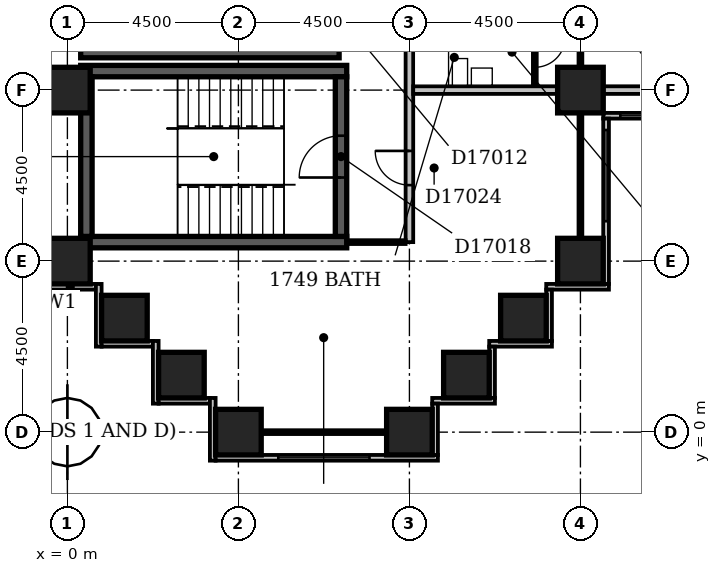
"""IFC4 building model, lengths in metres.
Left out: names, types, materials, properties, quantities, classifications, styles, units other than length and angle.
Written with IfcOpenShell. Run it as: python <this file> out.ifc"""

import sys

from ifc_helpers import new_model, si_unit, direction, frame, frame_2d, origin, origin_2d, place, context, subcontext, project, spatial, rectangle, extrude, element, fill, save


model = new_model("IFC4")
c1 = context("Model", 3, precision=1e-05, world=origin(), true_north=direction((0.0, 1.0)))
c2 = subcontext(c1, "Body", "Model", "MODEL_VIEW")
j1 = project(units=[si_unit("LENGTHUNIT", "METRE"), si_unit("PLANEANGLEUNIT", "RADIAN")], contexts=[c1])
p1 = place(None, origin())
s1 = spatial("IfcSite", under=j1, at=p1, CompositionType="ELEMENT")
p2 = place(p1, origin())
s2 = spatial("IfcBuilding", under=s1, at=p2, CompositionType="ELEMENT")
p3 = place(p2, frame((0.0, 0.0, 72.2)))
s3 = spatial("IfcBuildingStorey", under=s2, at=p3, CompositionType="ELEMENT", Elevation=72.2)
for number, where, z_axis, x_axis in (
    (1, (0.35, 5.0, -0.3), (0.0, 0.0, 1.0), (1.0, 0.0, 0.0)),
    (2, (0.35, 9.5, -0.3), (0.0, 0.0, 1.0), (1.0, 0.0, 0.0)),
):
    element("IfcWall", number, at=place(p3, frame(where, z_axis=z_axis, x_axis=x_axis)), inside=s3, PredefinedType="SHEAR", context=c2, shape_type="SweptSolid", body=[
        extrude(rectangle(XDim=7.0, YDim=0.3, at=frame_2d((3.5, 0.0))), origin(), (0.0, 0.0, 1.0), 3.6),
    ])
p4 = place(p3, frame((0.35, 10.0, -0.3), z_axis=(0.0, 0.0, 1.0), x_axis=(1.0, 0.0, 0.0)))
e3 = element("IfcWall", 3, at=p4, inside=s3, PredefinedType="SHEAR", context=c2, shape_type="SweptSolid", body=[
    extrude(rectangle(XDim=6.8, YDim=0.3, at=frame_2d((3.4, 0.0))), origin(), (0.0, 0.0, 1.0), 3.6),
])
p5 = place(p3, frame((0.5, 5.15, -0.3), z_axis=(0.0, 0.0, 1.0), x_axis=(0.0, 1.0, 0.0)))
e4 = element("IfcWall", 4, at=p5, inside=s3, PredefinedType="SHEAR", context=c2, shape_type="SweptSolid", body=[
    extrude(rectangle(XDim=4.2, YDim=0.3, at=frame_2d((2.1, 0.0))), origin(), (0.0, 0.0, 1.0), 3.6),
])
p6 = place(p3, frame((7.2, 5.15, -0.3), z_axis=(0.0, 0.0, 1.0), x_axis=(0.0, 1.0, 0.0)))
e5 = element("IfcWall", 5, at=p6, inside=s3, PredefinedType="SHEAR", context=c2, shape_type="SweptSolid", body=[
    extrude(rectangle(XDim=4.2, YDim=0.3, at=frame_2d((2.1, 0.0))), origin(), (0.0, 0.0, 1.0), 3.6),
])
p7 = place(p6, frame((1.55, 0.0, 0.3)))
e6 = element("IfcOpeningElement", 6, at=p7, cuts=e5, PredefinedType="OPENING", context=c2, shape_type="SweptSolid", body=[
    extrude(rectangle(XDim=1.1, YDim=2.1, at=frame_2d((0.55, 1.05))), frame((0.0, 0.162, 0.0), z_axis=(0.0, -1.0, 0.0), x_axis=(1.0, 0.0, 0.0)), (0.0, 0.0, 1.0), 0.324),
])
for number, where, z_axis, x_axis in (
    (7, (4.5, 0.0, -0.3), (0.0, 0.0, 1.0), (1.0, 0.0, 0.0)),
    (8, (9.0, 0.0, -0.3), (0.0, 0.0, 1.0), (1.0, 0.0, 0.0)),
    (9, (3.0, 1.5, -0.3), (0.0, 0.0, 1.0), (1.0, 0.0, 0.0)),
    (10, (10.5, 1.5, -0.3), (0.0, 0.0, 1.0), (1.0, 0.0, 0.0)),
    (11, (1.5, 3.0, -0.3), (0.0, 0.0, 1.0), (1.0, 0.0, 0.0)),
    (12, (12.0, 3.0, -0.3), (0.0, 0.0, 1.0), (1.0, 0.0, 0.0)),
    (13, (0.0, 4.5, -0.3), (0.0, 0.0, 1.0), (1.0, 0.0, 0.0)),
    (14, (13.5, 4.5, -0.3), (0.0, 0.0, 1.0), (1.0, 0.0, 0.0)),
    (15, (0.0, 9.0, -0.3), (0.0, 0.0, 1.0), (1.0, 0.0, 0.0)),
    (16, (13.5, 9.0, -0.3), (0.0, 0.0, 1.0), (1.0, 0.0, 0.0)),
):
    element("IfcColumn", number, at=place(p3, frame(where, z_axis=z_axis, x_axis=x_axis)), inside=s3, PredefinedType="COLUMN", context=c2, shape_type="SweptSolid", body=[
        extrude(rectangle(XDim=1.2, YDim=1.2, at=origin_2d()), origin(), (0.0, 0.0, 1.0), 3.6),
    ])
p8 = place(p3, frame((9.675, -0.6, 0.0), z_axis=(0.0, 0.0, 1.0), x_axis=(0.0, 1.0, 0.0)))
e17 = element("IfcWall", 17, at=p8, inside=s3, PredefinedType="STANDARD", context=c2, shape_type="SweptSolid", body=[
    extrude(rectangle(XDim=1.35, YDim=0.15, at=frame_2d((0.675, 0.0))), origin(), (0.0, 0.0, 1.0), 2.7),
])
p9 = place(p3, frame((9.6, 0.825, 0.0), z_axis=(0.0, 0.0, 1.0), x_axis=(1.0, 0.0, 0.0)))
e18 = element("IfcWall", 18, at=p9, inside=s3, PredefinedType="STANDARD", context=c2, shape_type="SweptSolid", body=[
    extrude(rectangle(XDim=1.65, YDim=0.15, at=frame_2d((0.825, 0.0))), origin(), (0.0, 0.0, 1.0), 2.7),
])
p10 = place(p3, frame((11.175, 0.9, 0.0), z_axis=(0.0, 0.0, 1.0), x_axis=(0.0, 1.0, 0.0)))
e19 = element("IfcWall", 19, at=p10, inside=s3, PredefinedType="STANDARD", context=c2, shape_type="SweptSolid", body=[
    extrude(rectangle(XDim=1.35, YDim=0.15, at=frame_2d((0.675, 0.0))), origin(), (0.0, 0.0, 1.0), 2.7),
])
p11 = place(p3, frame((11.1, 2.325, 0.0), z_axis=(0.0, 0.0, 1.0), x_axis=(1.0, 0.0, 0.0)))
e20 = element("IfcWall", 20, at=p11, inside=s3, PredefinedType="STANDARD", context=c2, shape_type="SweptSolid", body=[
    extrude(rectangle(XDim=1.65, YDim=0.15, at=frame_2d((0.825, 0.0))), origin(), (0.0, 0.0, 1.0), 2.7),
])
p12 = place(p3, frame((12.675, 2.4, 0.0), z_axis=(0.0, 0.0, 1.0), x_axis=(0.0, 1.0, 0.0)))
e21 = element("IfcWall", 21, at=p12, inside=s3, PredefinedType="STANDARD", context=c2, shape_type="SweptSolid", body=[
    extrude(rectangle(XDim=1.35, YDim=0.15, at=frame_2d((0.675, 0.0))), origin(), (0.0, 0.0, 1.0), 2.7),
])
p13 = place(p3, frame((12.6, 3.825, 0.0), z_axis=(0.0, 0.0, 1.0), x_axis=(1.0, 0.0, 0.0)))
e22 = element("IfcWall", 22, at=p13, inside=s3, PredefinedType="STANDARD", context=c2, shape_type="SweptSolid", body=[
    extrude(rectangle(XDim=1.65, YDim=0.15, at=frame_2d((0.825, 0.0))), origin(), (0.0, 0.0, 1.0), 2.7),
])
p14 = place(p3, frame((14.175, 3.9, 0.0), z_axis=(0.0, 0.0, 1.0), x_axis=(0.0, 1.0, 0.0)))
e23 = element("IfcWall", 23, at=p14, inside=s3, PredefinedType="STANDARD", context=c2, shape_type="SweptSolid", body=[
    extrude(rectangle(XDim=4.35, YDim=0.15, at=frame_2d((2.175, 0.0))), origin(), (0.0, 0.0, 1.0), 2.7),
])
p15 = place(p14, frame((1.65, 0.0, 0.6)))
e24 = element("IfcOpeningElement", 24, at=p15, cuts=e23, PredefinedType="OPENING", context=c2, shape_type="SweptSolid", body=[
    extrude(rectangle(XDim=2.4, YDim=1.8, at=frame_2d((1.2, 0.9))), frame((0.0, 0.087, 0.0), z_axis=(0.0, -1.0, 0.0), x_axis=(1.0, 0.0, 0.0)), (0.0, 0.0, 1.0), 0.174),
])
p16 = place(p3, frame((14.1, 8.325, 0.0), z_axis=(0.0, 0.0, 1.0), x_axis=(1.0, 0.0, 0.0)))
e25 = element("IfcWall", 25, at=p16, inside=s3, PredefinedType="STANDARD", context=c2, shape_type="SweptSolid", body=[
    extrude(rectangle(XDim=4.65, YDim=0.15, at=frame_2d((2.325, 0.0))), origin(), (0.0, 0.0, 1.0), 2.7),
])
p17 = place(p16, frame((0.45, 0.0, 0.6)))
e26 = element("IfcOpeningElement", 26, at=p17, cuts=e25, PredefinedType="OPENING", context=c2, shape_type="SweptSolid", body=[
    extrude(rectangle(XDim=2.4, YDim=1.8, at=frame_2d((1.2, 0.9))), frame((0.0, 0.087, 0.0), z_axis=(0.0, -1.0, 0.0), x_axis=(1.0, 0.0, 0.0)), (0.0, 0.0, 1.0), 0.174),
])
p18 = place(p3, frame((-0.6, 3.825, 0.0), z_axis=(0.0, 0.0, 1.0), x_axis=(1.0, 0.0, 0.0)))
e27 = element("IfcWall", 27, at=p18, inside=s3, PredefinedType="STANDARD", context=c2, shape_type="SweptSolid", body=[
    extrude(rectangle(XDim=1.35, YDim=0.15, at=frame_2d((0.675, 0.0))), origin(), (0.0, 0.0, 1.0), 2.7),
])
p19 = place(p3, frame((0.825, 3.9, 0.0), z_axis=(0.0, 0.0, 1.0), x_axis=(0.0, -1.0, 0.0)))
e28 = element("IfcWall", 28, at=p19, inside=s3, PredefinedType="STANDARD", context=c2, shape_type="SweptSolid", body=[
    extrude(rectangle(XDim=1.65, YDim=0.15, at=frame_2d((0.825, 0.0))), origin(), (0.0, 0.0, 1.0), 2.7),
])
p20 = place(p3, frame((0.9, 2.325, 0.0), z_axis=(0.0, 0.0, 1.0), x_axis=(1.0, 0.0, 0.0)))
e29 = element("IfcWall", 29, at=p20, inside=s3, PredefinedType="STANDARD", context=c2, shape_type="SweptSolid", body=[
    extrude(rectangle(XDim=1.35, YDim=0.15, at=frame_2d((0.675, 0.0))), origin(), (0.0, 0.0, 1.0), 2.7),
])
p21 = place(p3, frame((2.325, 2.4, 0.0), z_axis=(0.0, 0.0, 1.0), x_axis=(0.0, -1.0, 0.0)))
e30 = element("IfcWall", 30, at=p21, inside=s3, PredefinedType="STANDARD", context=c2, shape_type="SweptSolid", body=[
    extrude(rectangle(XDim=1.65, YDim=0.15, at=frame_2d((0.825, 0.0))), origin(), (0.0, 0.0, 1.0), 2.7),
])
p22 = place(p3, frame((2.4, 0.825, 0.0), z_axis=(0.0, 0.0, 1.0), x_axis=(1.0, 0.0, 0.0)))
e31 = element("IfcWall", 31, at=p22, inside=s3, PredefinedType="STANDARD", context=c2, shape_type="SweptSolid", body=[
    extrude(rectangle(XDim=1.35, YDim=0.15, at=frame_2d((0.675, 0.0))), origin(), (0.0, 0.0, 1.0), 2.7),
])
p23 = place(p3, frame((3.825, 0.9, 0.0), z_axis=(0.0, 0.0, 1.0), x_axis=(0.0, -1.0, 0.0)))
e32 = element("IfcWall", 32, at=p23, inside=s3, PredefinedType="STANDARD", context=c2, shape_type="SweptSolid", body=[
    extrude(rectangle(XDim=1.65, YDim=0.15, at=frame_2d((0.825, 0.0))), origin(), (0.0, 0.0, 1.0), 2.7),
])
p24 = place(p3, frame((3.9, -0.675, 0.0), z_axis=(0.0, 0.0, 1.0), x_axis=(1.0, 0.0, 0.0)))
e33 = element("IfcWall", 33, at=p24, inside=s3, PredefinedType="STANDARD", context=c2, shape_type="SweptSolid", body=[
    extrude(rectangle(XDim=5.85, YDim=0.15, at=frame_2d((2.925, 0.0))), origin(), (0.0, 0.0, 1.0), 2.7),
])
p25 = place(p24, frame((1.65, 0.0, 0.6)))
e34 = element("IfcOpeningElement", 34, at=p25, cuts=e33, PredefinedType="OPENING", context=c2, shape_type="SweptSolid", body=[
    extrude(rectangle(XDim=2.4, YDim=1.8, at=frame_2d((1.2, 0.9))), frame((0.0, 0.087, 0.0), z_axis=(0.0, -1.0, 0.0), x_axis=(1.0, 0.0, 0.0)), (0.0, 0.0, 1.0), 0.174),
])
p26 = place(p3, frame((5.1, 0.0, 0.0), z_axis=(0.0, 0.0, 1.0), x_axis=(1.0, 0.0, 0.0)))
e35 = element("IfcWall", 35, at=p26, inside=s3, PredefinedType="PARTITIONING", context=c2, shape_type="SweptSolid", body=[
    extrude(rectangle(XDim=3.3, YDim=0.1, at=frame_2d((1.65, 0.0))), origin(), (0.0, 0.0, 1.0), 2.7),
])
p27 = place(p3, frame((0.0, 4.4, 0.0), z_axis=(0.0, 0.0, 1.0), x_axis=(0.0, 1.0, 0.0)))
e36 = element("IfcWall", 36, at=p27, inside=s3, PredefinedType="PARTITIONING", context=c2, shape_type="SweptSolid", body=[
    extrude(rectangle(XDim=0.7, YDim=0.1, at=frame_2d((0.35, 0.0))), origin(), (0.0, 0.0, 1.0), 2.7),
])
p28 = place(p3, frame((7.349, 5.0, 0.0), z_axis=(0.0, 0.0, 1.0), x_axis=(1.0, 0.0, 0.0)))
e37 = element("IfcWall", 37, at=p28, inside=s3, PredefinedType="PARTITIONING", context=c2, shape_type="SweptSolid", body=[
    extrude(rectangle(XDim=1.551, YDim=0.1, at=frame_2d((0.775, 0.0))), origin(), (0.0, 0.0, 1.0), 3.3),
])
p29 = place(p3, frame((9.0, 5.0, 0.0), z_axis=(0.0, 0.0, 1.0), x_axis=(0.0, 1.0, 0.0)))
e38 = element("IfcWall", 38, at=p29, inside=s3, PredefinedType="PARTITIONING", context=c2, shape_type="SweptSolid", body=[
    extrude(rectangle(XDim=44.5, YDim=0.2, at=frame_2d((22.25, 0.0))), origin(), (0.0, 0.0, 1.0), 3.3),
])
p30 = place(p29, frame((22.3, 0.0, 0.0)))
e39 = element("IfcOpeningElement", 39, at=p30, cuts=e38, PredefinedType="OPENING", context=c2, shape_type="SweptSolid", body=[
    extrude(rectangle(XDim=1.0, YDim=2.1, at=frame_2d((0.5, 1.05))), frame((0.0, 0.112, 0.0), z_axis=(0.0, -1.0, 0.0), x_axis=(1.0, 0.0, 0.0)), (0.0, 0.0, 1.0), 0.224),
])
p31 = place(p29, frame((15.7, 0.0, 0.0)))
e40 = element("IfcOpeningElement", 40, at=p31, cuts=e38, PredefinedType="OPENING", context=c2, shape_type="SweptSolid", body=[
    extrude(rectangle(XDim=1.0, YDim=2.1, at=frame_2d((0.5, 1.05))), frame((0.0, 0.112, 0.0), z_axis=(0.0, -1.0, 0.0), x_axis=(1.0, 0.0, 0.0)), (0.0, 0.0, 1.0), 0.224),
])
p32 = place(p29, frame((10.45, 0.0, 0.0)))
e41 = element("IfcOpeningElement", 41, at=p32, cuts=e38, PredefinedType="OPENING", context=c2, shape_type="SweptSolid", body=[
    extrude(rectangle(XDim=1.0, YDim=2.1, at=frame_2d((0.5, 1.05))), frame((0.0, 0.112, 0.0), z_axis=(0.0, -1.0, 0.0), x_axis=(1.0, 0.0, 0.0)), (0.0, 0.0, 1.0), 0.224),
])
p33 = place(p29, frame((5.95, 0.0, 0.0)))
e42 = element("IfcOpeningElement", 42, at=p33, cuts=e38, PredefinedType="OPENING", context=c2, shape_type="SweptSolid", body=[
    extrude(rectangle(XDim=1.0, YDim=2.1, at=frame_2d((0.5, 1.05))), frame((0.0, 0.112, 0.0), z_axis=(0.0, -1.0, 0.0), x_axis=(1.0, 0.0, 0.0)), (0.0, 0.0, 1.0), 0.224),
])
p34 = place(p29, frame((37.25, 0.0, 0.0)))
e43 = element("IfcOpeningElement", 43, at=p34, cuts=e38, PredefinedType="OPENING", context=c2, shape_type="SweptSolid", body=[
    extrude(rectangle(XDim=0.9, YDim=2.1, at=frame_2d((0.45, 1.05))), frame((0.0, 0.112, 0.0), z_axis=(0.0, -1.0, 0.0), x_axis=(1.0, 0.0, 0.0)), (0.0, 0.0, 1.0), 0.224),
])
p35 = place(p29, frame((1.5, 0.0, 0.0)))
e44 = element("IfcOpeningElement", 44, at=p35, cuts=e38, PredefinedType="OPENING", context=c2, shape_type="SweptSolid", body=[
    extrude(rectangle(XDim=0.9, YDim=2.1, at=frame_2d((0.45, 1.05))), frame((0.0, 0.112, 0.0), z_axis=(0.0, -1.0, 0.0), x_axis=(1.0, 0.0, 0.0)), (0.0, 0.0, 1.0), 0.224),
])
p36 = place(p3, frame((13.5, 5.1, 0.0), z_axis=(0.0, 0.0, 1.0), x_axis=(0.0, 1.0, 0.0)))
e45 = element("IfcWall", 45, at=p36, inside=s3, PredefinedType="PARTITIONING", context=c2, shape_type="SweptSolid", body=[
    extrude(rectangle(XDim=3.3, YDim=0.1, at=frame_2d((1.65, 0.0))), origin(), (0.0, 0.0, 1.0), 2.7),
])
p37 = place(p3, frame((9.1, 9.0, 0.0), z_axis=(0.0, 0.0, 1.0), x_axis=(1.0, 0.0, 0.0)))
e46 = element("IfcWall", 46, at=p37, inside=s3, PredefinedType="PARTITIONING", context=c2, shape_type="SweptSolid", body=[
    extrude(rectangle(XDim=3.8, YDim=0.2, at=frame_2d((1.9, 0.0))), origin(), (0.0, 0.0, 1.0), 3.3),
])
p38 = place(p3, frame((14.1, 9.0, 0.0), z_axis=(0.0, 0.0, 1.0), x_axis=(1.0, 0.0, 0.0)))
e47 = element("IfcWall", 47, at=p38, inside=s3, PredefinedType="PARTITIONING", context=c2, shape_type="SweptSolid", body=[
    extrude(rectangle(XDim=3.3, YDim=0.2, at=frame_2d((1.65, 0.0))), origin(), (0.0, 0.0, 1.0), 2.7),
])
p39 = place(p3, frame((12.3, 9.1, 0.0), z_axis=(0.0, 0.0, 1.0), x_axis=(0.0, 1.0, 0.0)))
e48 = element("IfcWall", 48, at=p39, inside=s3, PredefinedType="PARTITIONING", context=c2, shape_type="SweptSolid", body=[
    extrude(rectangle(XDim=1.6, YDim=0.1, at=frame_2d((0.8, 0.0))), origin(), (0.0, 0.0, 1.0), 3.3),
])
p40 = place(p39, frame((0.5, 0.0, 0.0)))
e49 = element("IfcOpeningElement", 49, at=p40, cuts=e48, PredefinedType="OPENING", context=c2, shape_type="SweptSolid", body=[
    extrude(rectangle(XDim=0.8, YDim=2.1, at=frame_2d((0.4, 1.05))), frame((0.0, 0.062, 0.0), z_axis=(0.0, -1.0, 0.0), x_axis=(1.0, 0.0, 0.0)), (0.0, 0.0, 1.0), 0.124),
])
p41 = place(p3, frame((13.5, 9.6, 0.0), z_axis=(0.0, 0.0, 1.0), x_axis=(0.0, 1.0, 0.0)))
e50 = element("IfcWall", 50, at=p41, inside=s3, PredefinedType="PARTITIONING", context=c2, shape_type="SweptSolid", body=[
    extrude(rectangle(XDim=8.3, YDim=0.1, at=frame_2d((4.15, 0.0))), origin(), (0.0, 0.0, 1.0), 3.3),
])
p42 = place(p41, frame((5.7, 0.0, 0.0)))
e51 = element("IfcOpeningElement", 51, at=p42, cuts=e50, PredefinedType="OPENING", context=c2, shape_type="SweptSolid", body=[
    extrude(rectangle(XDim=0.9, YDim=2.1, at=frame_2d((0.45, 1.05))), frame((0.0, 0.062, 0.0), z_axis=(0.0, -1.0, 0.0), x_axis=(1.0, 0.0, 0.0)), (0.0, 0.0, 1.0), 0.124),
])
p43 = place(p41, frame((1.2, 0.0, 0.0)))
e52 = element("IfcOpeningElement", 52, at=p43, cuts=e50, PredefinedType="OPENING", context=c2, shape_type="SweptSolid", body=[
    extrude(rectangle(XDim=0.9, YDim=2.1, at=frame_2d((0.45, 1.05))), frame((0.0, 0.062, 0.0), z_axis=(0.0, -1.0, 0.0), x_axis=(1.0, 0.0, 0.0)), (0.0, 0.0, 1.0), 0.124),
])
p44 = place(p15, origin())
e53 = element("IfcWindow", 53, at=p44, inside=s3, PartitioningType="SINGLE_PANEL", PredefinedType="WINDOW", context=c2, shape_type="SweptSolid", body=[
    extrude(rectangle(XDim=2.4, YDim=1.8, at=frame_2d((1.2, 0.9))), frame((0.0, 0.03, 0.0), z_axis=(0.0, -1.0, 0.0), x_axis=(1.0, 0.0, 0.0)), (0.0, 0.0, 1.0), 0.06),
])
fill(e24, e53)
p45 = place(p17, origin())
e54 = element("IfcWindow", 54, at=p45, inside=s3, PartitioningType="SINGLE_PANEL", PredefinedType="WINDOW", context=c2, shape_type="SweptSolid", body=[
    extrude(rectangle(XDim=2.4, YDim=1.8, at=frame_2d((1.2, 0.9))), frame((0.0, 0.03, 0.0), z_axis=(0.0, -1.0, 0.0), x_axis=(1.0, 0.0, 0.0)), (0.0, 0.0, 1.0), 0.06),
])
fill(e26, e54)
p46 = place(p25, origin())
e55 = element("IfcWindow", 55, at=p46, inside=s3, PartitioningType="SINGLE_PANEL", PredefinedType="WINDOW", context=c2, shape_type="SweptSolid", body=[
    extrude(rectangle(XDim=2.4, YDim=1.8, at=frame_2d((1.2, 0.9))), frame((0.0, 0.03, 0.0), z_axis=(0.0, -1.0, 0.0), x_axis=(1.0, 0.0, 0.0)), (0.0, 0.0, 1.0), 0.06),
])
fill(e34, e55)
p47 = place(p7, origin())
e56 = element("IfcDoor", 56, at=p47, inside=s3, OperationType="SINGLE_SWING_LEFT", PredefinedType="DOOR", context=c2, shape_type="SweptSolid", body=[
    extrude(rectangle(XDim=1.1, YDim=2.1, at=frame_2d((0.55, 1.05))), frame((0.0, 0.025, 0.0), z_axis=(0.0, -1.0, 0.0), x_axis=(1.0, 0.0, 0.0)), (0.0, 0.0, 1.0), 0.05),
])
fill(e6, e56)
p48 = place(p35, frame((0.9, 0.0, 0.0), z_axis=(0.0, 0.0, 1.0), x_axis=(-1.0, 0.0, 0.0)))
e57 = element("IfcDoor", 57, at=p48, inside=s3, OperationType="SINGLE_SWING_LEFT", PredefinedType="DOOR", context=c2, shape_type="SweptSolid", body=[
    extrude(rectangle(XDim=0.9, YDim=2.1, at=frame_2d((0.45, 1.05))), frame((0.0, 0.025, 0.0), z_axis=(0.0, -1.0, 0.0), x_axis=(1.0, 0.0, 0.0)), (0.0, 0.0, 1.0), 0.05),
])
fill(e44, e57)
p49 = place(p40, origin())
e58 = element("IfcDoor", 58, at=p49, inside=s3, OperationType="SINGLE_SWING_RIGHT", PredefinedType="DOOR", context=c2, shape_type="SweptSolid", body=[
    extrude(rectangle(XDim=0.8, YDim=2.1, at=frame_2d((0.4, 1.05))), frame((0.0, 0.025, 0.0), z_axis=(0.0, -1.0, 0.0), x_axis=(1.0, 0.0, 0.0)), (0.0, 0.0, 1.0), 0.05),
])
fill(e49, e58)
save(model, sys.argv[1])
